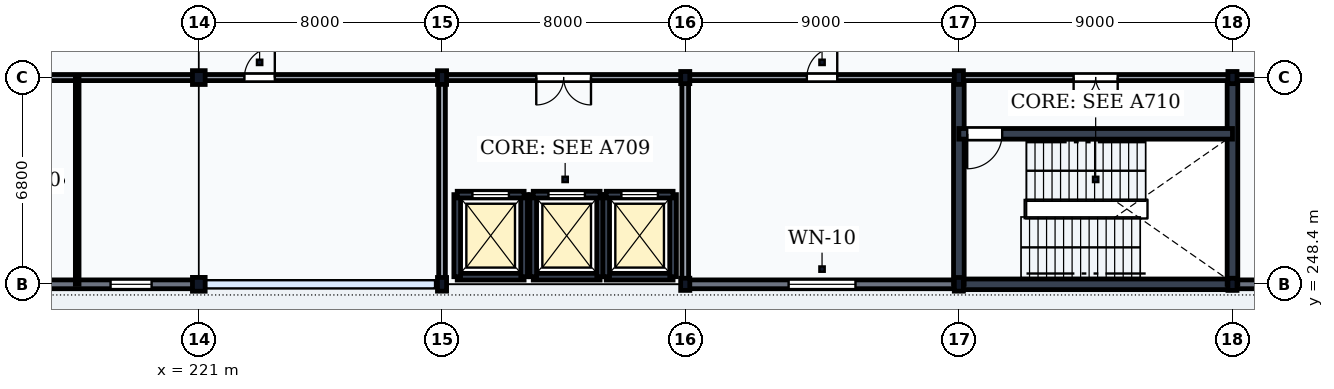
"""IFC4 building model, lengths in metres.
Left out: names, types, materials, properties, quantities, classifications, styles, units other than length and angle.
Written with IfcOpenShell. Run it as: python <this file> out.ifc"""

import sys

from ifc_helpers import new_model, si_unit, direction, frame, frame_2d, origin, origin_2d, place, context, subcontext, project, spatial, rectangle, i_section, extrude, element, fill, save


model = new_model("IFC4")
c1 = context("Model", 3, precision=1e-05, world=origin(), true_north=direction((0.0, 1.0)))
c2 = subcontext(c1, "Body", "Model", "MODEL_VIEW")
j1 = project(units=[si_unit("LENGTHUNIT", "METRE"), si_unit("PLANEANGLEUNIT", "RADIAN")], contexts=[c1])
p1 = place(None, origin())
s1 = spatial("IfcSite", under=j1, at=p1, CompositionType="ELEMENT")
p2 = place(p1, origin())
s2 = spatial("IfcBuilding", under=s1, at=p2, CompositionType="ELEMENT")
p3 = place(p2, frame((0.0, 0.0, 5.4)))
s3 = spatial("IfcBuildingStorey", under=s2, at=p3, CompositionType="ELEMENT", Elevation=5.4)
for number, where, z_axis, x_axis in (
    (1, (221.0, 248.4, 0.0), (0.0, 0.0, 1.0), (1.0, 0.0, 0.0)),
    (2, (221.0, 255.2, 0.0), (0.0, 0.0, 1.0), (1.0, 0.0, 0.0)),
):
    element("IfcColumn", number, at=place(p3, frame(where, z_axis=z_axis, x_axis=x_axis)), inside=s3, PredefinedType="COLUMN", context=c2, shape_type="SweptSolid", body=[
        extrude(i_section(OverallWidth=0.418, OverallDepth=0.455, WebThickness=0.042, FlangeThickness=0.068, FilletRadius=0.015, at=origin_2d()), origin(), (0.0, 0.0, 1.0), 5.1),
    ])
for number, where, z_axis, x_axis in (
    (3, (229.0, 248.4, 0.0), (0.0, 0.0, 1.0), (1.0, 0.0, 0.0)),
    (4, (229.0, 255.2, 0.0), (0.0, 0.0, 1.0), (1.0, 0.0, 0.0)),
):
    element("IfcColumn", number, at=place(p3, frame(where, z_axis=z_axis, x_axis=x_axis)), inside=s3, PredefinedType="COLUMN", context=c2, shape_type="SweptSolid", body=[
        extrude(i_section(OverallWidth=0.3, OverallDepth=0.45, WebThickness=0.014, FlangeThickness=0.026, FilletRadius=0.027, at=origin_2d()), origin(), (0.0, 0.0, 1.0), 5.1),
    ])
for number, where, z_axis, x_axis in (
    (5, (237.0, 248.4, 0.0), (0.0, 0.0, 1.0), (1.0, 0.0, 0.0)),
    (6, (237.0, 255.2, 0.0), (0.0, 0.0, 1.0), (1.0, 0.0, 0.0)),
):
    element("IfcColumn", number, at=place(p3, frame(where, z_axis=z_axis, x_axis=x_axis)), inside=s3, PredefinedType="COLUMN", context=c2, shape_type="SweptSolid", body=[
        extrude(i_section(OverallWidth=0.3, OverallDepth=0.4, WebThickness=0.013, FlangeThickness=0.024, FilletRadius=0.027, at=origin_2d()), origin(), (0.0, 0.0, 1.0), 5.1),
    ])
for number, where, z_axis, x_axis in (
    (7, (246.0, 248.4, 0.0), (0.0, 0.0, 1.0), (1.0, 0.0, 0.0)),
    (8, (246.0, 255.2, 0.0), (0.0, 0.0, 1.0), (1.0, 0.0, 0.0)),
):
    element("IfcColumn", number, at=place(p3, frame(where, z_axis=z_axis, x_axis=x_axis)), inside=s3, PredefinedType="COLUMN", context=c2, shape_type="SweptSolid", body=[
        extrude(i_section(OverallWidth=0.3, OverallDepth=0.45, WebThickness=0.014, FlangeThickness=0.026, FilletRadius=0.027, at=origin_2d()), origin(), (0.0, 0.0, 1.0), 5.1),
    ])
for number, where, z_axis, x_axis in (
    (9, (255.0, 248.4, 0.0), (0.0, 0.0, 1.0), (1.0, 0.0, 0.0)),
    (10, (255.0, 255.2, 0.0), (0.0, 0.0, 1.0), (1.0, 0.0, 0.0)),
):
    element("IfcColumn", number, at=place(p3, frame(where, z_axis=z_axis, x_axis=x_axis)), inside=s3, PredefinedType="COLUMN", context=c2, shape_type="SweptSolid", body=[
        extrude(i_section(OverallWidth=0.3, OverallDepth=0.4, WebThickness=0.013, FlangeThickness=0.024, FilletRadius=0.027, at=origin_2d()), origin(), (0.0, 0.0, 1.0), 5.1),
    ])
p4 = place(p3, frame((213.006, 248.4, 0.0), z_axis=(0.0, 0.0, 1.0), x_axis=(1.0, 0.0, 0.0)))
e11 = element("IfcWall", 11, at=p4, inside=s3, PredefinedType="SOLIDWALL", context=c2, shape_type="SweptSolid", body=[
    extrude(rectangle(XDim=7.988, YDim=0.29, at=frame_2d((3.994, 0.0))), origin(), (0.0, 0.0, 1.0), 4.548),
])
p5 = place(p4, frame((5.091, 0.0, 0.95)))
e12 = element("IfcOpeningElement", 12, at=p5, cuts=e11, PredefinedType="OPENING", context=c2, shape_type="SweptSolid", body=[
    extrude(rectangle(XDim=1.35, YDim=1.8, at=frame_2d((0.675, 0.9))), frame((0.0, 0.16, 0.0), z_axis=(0.0, -1.0, 0.0), x_axis=(1.0, 0.0, 0.0)), (0.0, 0.0, 1.0), 0.32),
])
p6 = place(p3, frame((237.006, 248.4, 0.0), z_axis=(0.0, 0.0, 1.0), x_axis=(1.0, 0.0, 0.0)))
e13 = element("IfcWall", 13, at=p6, inside=s3, PredefinedType="SOLIDWALL", context=c2, shape_type="SweptSolid", body=[
    extrude(rectangle(XDim=8.988, YDim=0.29, at=frame_2d((4.494, 0.0))), origin(), (0.0, 0.0, 1.0), 4.508),
])
p7 = place(p6, frame((3.394, 0.0, 0.95)))
e14 = element("IfcOpeningElement", 14, at=p7, cuts=e13, PredefinedType="OPENING", context=c2, shape_type="SweptSolid", body=[
    extrude(rectangle(XDim=2.2, YDim=2.1, at=frame_2d((1.1, 1.05))), frame((0.0, 0.16, 0.0), z_axis=(0.0, -1.0, 0.0), x_axis=(1.0, 0.0, 0.0)), (0.0, 0.0, 1.0), 0.32),
])
p8 = place(p3, frame((255.006, 248.4, 0.0), z_axis=(0.0, 0.0, 1.0), x_axis=(1.0, 0.0, 0.0)))
e15 = element("IfcWall", 15, at=p8, inside=s3, PredefinedType="SOLIDWALL", context=c2, shape_type="SweptSolid", body=[
    extrude(rectangle(XDim=8.988, YDim=0.29, at=frame_2d((4.494, 0.0))), origin(), (0.0, 0.0, 1.0), 4.508),
])
p9 = place(p8, frame((3.594, 0.0, 0.95)))
e16 = element("IfcOpeningElement", 16, at=p9, cuts=e15, PredefinedType="OPENING", context=c2, shape_type="SweptSolid", body=[
    extrude(rectangle(XDim=1.8, YDim=2.0, at=frame_2d((0.9, 1.0))), frame((0.0, 0.16, 0.0), z_axis=(0.0, -1.0, 0.0), x_axis=(1.0, 0.0, 0.0)), (0.0, 0.0, 1.0), 0.32),
])
p10 = place(p3, frame((246.0, 248.4, 0.0), z_axis=(0.0, 0.0, 1.0), x_axis=(1.0, 0.0, 0.0)))
e17 = element("IfcWall", 17, at=p10, inside=s3, PredefinedType="SHEAR", context=c2, shape_type="SweptSolid", body=[
    extrude(rectangle(XDim=9.0, YDim=0.35, at=frame_2d((4.5, 0.0))), origin(), (0.0, 0.0, 1.0), 4.86),
])
for number, where, z_axis, x_axis in (
    (18, (246.0, 248.4, 0.0), (0.0, 0.0, 1.0), (0.0, 1.0, 0.0)),
    (19, (255.0, 248.4, 0.0), (0.0, 0.0, 1.0), (0.0, 1.0, 0.0)),
):
    element("IfcWall", number, at=place(p3, frame(where, z_axis=z_axis, x_axis=x_axis)), inside=s3, PredefinedType="SHEAR", context=c2, shape_type="SweptSolid", body=[
        extrude(rectangle(XDim=6.8, YDim=0.35, at=frame_2d((3.4, 0.0))), origin(), (0.0, 0.0, 1.0), 4.86),
    ])
p11 = place(p3, frame((246.0, 253.35, 0.0), z_axis=(0.0, 0.0, 1.0), x_axis=(1.0, 0.0, 0.0)))
e20 = element("IfcWall", 20, at=p11, inside=s3, PredefinedType="SHEAR", context=c2, shape_type="SweptSolid", body=[
    extrude(rectangle(XDim=9.0, YDim=0.35, at=frame_2d((4.5, 0.0))), origin(), (0.0, 0.0, 1.0), 4.86),
])
p12 = place(p11, frame((0.275, 0.0, 0.0)))
e21 = element("IfcOpeningElement", 21, at=p12, cuts=e20, PredefinedType="OPENING", context=c2, shape_type="SweptSolid", body=[
    extrude(rectangle(XDim=1.15, YDim=2.15, at=frame_2d((0.575, 1.075))), frame((0.0, 0.19, 0.0), z_axis=(0.0, -1.0, 0.0), x_axis=(1.0, 0.0, 0.0)), (0.0, 0.0, 1.0), 0.38),
])
p13 = place(p3, frame((246.0, 255.2, 0.0), z_axis=(0.0, 0.0, 1.0), x_axis=(1.0, 0.0, 0.0)))
e22 = element("IfcWall", 22, at=p13, inside=s3, PredefinedType="PARTITIONING", context=c2, shape_type="SweptSolid", body=[
    extrude(rectangle(XDim=9.0, YDim=0.2, at=frame_2d((4.5, 0.0))), origin(), (0.0, 0.0, 1.0), 4.308),
])
p14 = place(p13, frame((3.775, 0.0, 0.0)))
e23 = element("IfcOpeningElement", 23, at=p14, cuts=e22, PredefinedType="OPENING", context=c2, shape_type="SweptSolid", body=[
    extrude(rectangle(XDim=1.45, YDim=2.2, at=frame_2d((0.725, 1.1))), frame((0.0, 0.115, 0.0), z_axis=(0.0, -1.0, 0.0), x_axis=(1.0, 0.0, 0.0)), (0.0, 0.0, 1.0), 0.23),
])
p15 = place(p3, frame((229.5, 248.65, 0.0), z_axis=(0.0, 0.0, 1.0), x_axis=(1.0, 0.0, 0.0)))
e24 = element("IfcWall", 24, at=p15, inside=s3, PredefinedType="SHEAR", context=c2, shape_type="SweptSolid", body=[
    extrude(rectangle(XDim=2.2, YDim=0.22, at=frame_2d((1.1, 0.0))), origin(), (0.0, 0.0, 1.0), 4.86),
])
for number, where, z_axis, x_axis in (
    (25, (229.5, 248.65, 0.0), (0.0, 0.0, 1.0), (0.0, 1.0, 0.0)),
    (26, (231.7, 248.65, 0.0), (0.0, 0.0, 1.0), (0.0, 1.0, 0.0)),
):
    element("IfcWall", number, at=place(p3, frame(where, z_axis=z_axis, x_axis=x_axis)), inside=s3, PredefinedType="SHEAR", context=c2, shape_type="SweptSolid", body=[
        extrude(rectangle(XDim=2.7, YDim=0.22, at=frame_2d((1.35, 0.0))), origin(), (0.0, 0.0, 1.0), 4.86),
    ])
p16 = place(p3, frame((229.5, 251.35, 0.0), z_axis=(0.0, 0.0, 1.0), x_axis=(1.0, 0.0, 0.0)))
e27 = element("IfcWall", 27, at=p16, inside=s3, PredefinedType="SHEAR", context=c2, shape_type="SweptSolid", body=[
    extrude(rectangle(XDim=2.2, YDim=0.22, at=frame_2d((1.1, 0.0))), origin(), (0.0, 0.0, 1.0), 4.86),
])
p17 = place(p16, frame((0.5, 0.0, 0.0)))
e28 = element("IfcOpeningElement", 28, at=p17, cuts=e27, PredefinedType="OPENING", context=c2, shape_type="SweptSolid", body=[
    extrude(rectangle(XDim=1.2, YDim=2.2, at=frame_2d((0.6, 1.1))), frame((0.0, 0.125, 0.0), z_axis=(0.0, -1.0, 0.0), x_axis=(1.0, 0.0, 0.0)), (0.0, 0.0, 1.0), 0.25),
])
p18 = place(p3, frame((232.0, 248.65, 0.0), z_axis=(0.0, 0.0, 1.0), x_axis=(1.0, 0.0, 0.0)))
e29 = element("IfcWall", 29, at=p18, inside=s3, PredefinedType="SHEAR", context=c2, shape_type="SweptSolid", body=[
    extrude(rectangle(XDim=2.2, YDim=0.22, at=frame_2d((1.1, 0.0))), origin(), (0.0, 0.0, 1.0), 4.86),
])
for number, where, z_axis, x_axis in (
    (30, (232.0, 248.65, 0.0), (0.0, 0.0, 1.0), (0.0, 1.0, 0.0)),
    (31, (234.2, 248.65, 0.0), (0.0, 0.0, 1.0), (0.0, 1.0, 0.0)),
):
    element("IfcWall", number, at=place(p3, frame(where, z_axis=z_axis, x_axis=x_axis)), inside=s3, PredefinedType="SHEAR", context=c2, shape_type="SweptSolid", body=[
        extrude(rectangle(XDim=2.7, YDim=0.22, at=frame_2d((1.35, 0.0))), origin(), (0.0, 0.0, 1.0), 4.86),
    ])
p19 = place(p3, frame((232.0, 251.35, 0.0), z_axis=(0.0, 0.0, 1.0), x_axis=(1.0, 0.0, 0.0)))
e32 = element("IfcWall", 32, at=p19, inside=s3, PredefinedType="SHEAR", context=c2, shape_type="SweptSolid", body=[
    extrude(rectangle(XDim=2.2, YDim=0.22, at=frame_2d((1.1, 0.0))), origin(), (0.0, 0.0, 1.0), 4.86),
])
p20 = place(p19, frame((0.5, 0.0, 0.0)))
e33 = element("IfcOpeningElement", 33, at=p20, cuts=e32, PredefinedType="OPENING", context=c2, shape_type="SweptSolid", body=[
    extrude(rectangle(XDim=1.2, YDim=2.2, at=frame_2d((0.6, 1.1))), frame((0.0, 0.125, 0.0), z_axis=(0.0, -1.0, 0.0), x_axis=(1.0, 0.0, 0.0)), (0.0, 0.0, 1.0), 0.25),
])
p21 = place(p3, frame((234.4, 248.65, 0.0), z_axis=(0.0, 0.0, 1.0), x_axis=(1.0, 0.0, 0.0)))
e34 = element("IfcWall", 34, at=p21, inside=s3, PredefinedType="SHEAR", context=c2, shape_type="SweptSolid", body=[
    extrude(rectangle(XDim=2.2, YDim=0.22, at=frame_2d((1.1, 0.0))), origin(), (0.0, 0.0, 1.0), 4.86),
])
for number, where, z_axis, x_axis in (
    (35, (234.4, 248.65, 0.0), (0.0, 0.0, 1.0), (0.0, 1.0, 0.0)),
    (36, (236.6, 248.65, 0.0), (0.0, 0.0, 1.0), (0.0, 1.0, 0.0)),
):
    element("IfcWall", number, at=place(p3, frame(where, z_axis=z_axis, x_axis=x_axis)), inside=s3, PredefinedType="SHEAR", context=c2, shape_type="SweptSolid", body=[
        extrude(rectangle(XDim=2.7, YDim=0.22, at=frame_2d((1.35, 0.0))), origin(), (0.0, 0.0, 1.0), 4.86),
    ])
p22 = place(p3, frame((234.4, 251.35, 0.0), z_axis=(0.0, 0.0, 1.0), x_axis=(1.0, 0.0, 0.0)))
e37 = element("IfcWall", 37, at=p22, inside=s3, PredefinedType="SHEAR", context=c2, shape_type="SweptSolid", body=[
    extrude(rectangle(XDim=2.2, YDim=0.22, at=frame_2d((1.1, 0.0))), origin(), (0.0, 0.0, 1.0), 4.86),
])
p23 = place(p22, frame((0.5, 0.0, 0.0)))
e38 = element("IfcOpeningElement", 38, at=p23, cuts=e37, PredefinedType="OPENING", context=c2, shape_type="SweptSolid", body=[
    extrude(rectangle(XDim=1.2, YDim=2.2, at=frame_2d((0.6, 1.1))), frame((0.0, 0.125, 0.0), z_axis=(0.0, -1.0, 0.0), x_axis=(1.0, 0.0, 0.0)), (0.0, 0.0, 1.0), 0.25),
])
for number, where, z_axis, x_axis in (
    (39, (229.0, 248.4, 0.0), (0.0, 0.0, 1.0), (0.0, 1.0, 0.0)),
    (40, (237.0, 248.4, 0.0), (0.0, 0.0, 1.0), (0.0, 1.0, 0.0)),
):
    element("IfcWall", number, at=place(p3, frame(where, z_axis=z_axis, x_axis=x_axis)), inside=s3, PredefinedType="PARTITIONING", context=c2, shape_type="SweptSolid", body=[
        extrude(rectangle(XDim=6.8, YDim=0.22, at=frame_2d((3.4, 0.0))), origin(), (0.0, 0.0, 1.0), 4.498),
    ])
p24 = place(p3, frame((229.0, 255.2, 0.0), z_axis=(0.0, 0.0, 1.0), x_axis=(1.0, 0.0, 0.0)))
e41 = element("IfcWall", 41, at=p24, inside=s3, PredefinedType="PARTITIONING", context=c2, shape_type="SweptSolid", body=[
    extrude(rectangle(XDim=8.0, YDim=0.2, at=frame_2d((4.0, 0.0))), origin(), (0.0, 0.0, 1.0), 4.408),
])
p25 = place(p24, frame((3.1, 0.0, 0.0)))
e42 = element("IfcOpeningElement", 42, at=p25, cuts=e41, PredefinedType="OPENING", context=c2, shape_type="SweptSolid", body=[
    extrude(rectangle(XDim=1.8, YDim=2.4, at=frame_2d((0.9, 1.2))), frame((0.0, 0.115, 0.0), z_axis=(0.0, -1.0, 0.0), x_axis=(1.0, 0.0, 0.0)), (0.0, 0.0, 1.0), 0.23),
])
p26 = place(p3, frame((205.0, 255.2, 0.0), z_axis=(0.0, 0.0, 1.0), x_axis=(1.0, 0.0, 0.0)))
e43 = element("IfcWall", 43, at=p26, inside=s3, PredefinedType="PARTITIONING", context=c2, shape_type="SweptSolid", body=[
    extrude(rectangle(XDim=24.0, YDim=0.2, at=frame_2d((12.0, 0.0))), origin(), (0.0, 0.0, 1.0), 4.358),
])
p27 = place(p26, frame((5.5, 0.0, 0.0)))
e44 = element("IfcOpeningElement", 44, at=p27, cuts=e43, PredefinedType="OPENING", context=c2, shape_type="SweptSolid", body=[
    extrude(rectangle(XDim=1.0, YDim=2.1, at=frame_2d((0.5, 1.05))), frame((0.0, 0.115, 0.0), z_axis=(0.0, -1.0, 0.0), x_axis=(1.0, 0.0, 0.0)), (0.0, 0.0, 1.0), 0.23),
])
p28 = place(p26, frame((17.5, 0.0, 0.0)))
e45 = element("IfcOpeningElement", 45, at=p28, cuts=e43, PredefinedType="OPENING", context=c2, shape_type="SweptSolid", body=[
    extrude(rectangle(XDim=1.0, YDim=2.1, at=frame_2d((0.5, 1.05))), frame((0.0, 0.115, 0.0), z_axis=(0.0, -1.0, 0.0), x_axis=(1.0, 0.0, 0.0)), (0.0, 0.0, 1.0), 0.23),
])
p29 = place(p3, frame((217.0, 248.4, 0.0), z_axis=(0.0, 0.0, 1.0), x_axis=(0.0, 1.0, 0.0)))
e46 = element("IfcWall", 46, at=p29, inside=s3, PredefinedType="PARTITIONING", context=c2, shape_type="SweptSolid", body=[
    extrude(rectangle(XDim=6.8, YDim=0.12, at=frame_2d((3.4, 0.0))), origin(), (0.0, 0.0, 1.0), 4.618),
])
p30 = place(p3, frame((237.0, 255.2, 0.0), z_axis=(0.0, 0.0, 1.0), x_axis=(1.0, 0.0, 0.0)))
e47 = element("IfcWall", 47, at=p30, inside=s3, PredefinedType="PARTITIONING", context=c2, shape_type="SweptSolid", body=[
    extrude(rectangle(XDim=9.0, YDim=0.2, at=frame_2d((4.5, 0.0))), origin(), (0.0, 0.0, 1.0), 4.308),
])
p31 = place(p30, frame((4.0, 0.0, 0.0)))
e48 = element("IfcOpeningElement", 48, at=p31, cuts=e47, PredefinedType="OPENING", context=c2, shape_type="SweptSolid", body=[
    extrude(rectangle(XDim=1.0, YDim=2.1, at=frame_2d((0.5, 1.05))), frame((0.0, 0.115, 0.0), z_axis=(0.0, -1.0, 0.0), x_axis=(1.0, 0.0, 0.0)), (0.0, 0.0, 1.0), 0.23),
])
p32 = place(p3, frame((255.0, 255.2, 0.0), z_axis=(0.0, 0.0, 1.0), x_axis=(1.0, 0.0, 0.0)))
e49 = element("IfcWall", 49, at=p32, inside=s3, PredefinedType="PARTITIONING", context=c2, shape_type="SweptSolid", body=[
    extrude(rectangle(XDim=18.0, YDim=0.2, at=frame_2d((9.0, 0.0))), origin(), (0.0, 0.0, 1.0), 4.308),
])
p33 = place(p32, frame((4.0, 0.0, 0.0)))
e50 = element("IfcOpeningElement", 50, at=p33, cuts=e49, PredefinedType="OPENING", context=c2, shape_type="SweptSolid", body=[
    extrude(rectangle(XDim=1.0, YDim=2.1, at=frame_2d((0.5, 1.05))), frame((0.0, 0.115, 0.0), z_axis=(0.0, -1.0, 0.0), x_axis=(1.0, 0.0, 0.0)), (0.0, 0.0, 1.0), 0.23),
])
p34 = place(p5, origin())
e51 = element("IfcWindow", 51, at=p34, inside=s3, PartitioningType="SINGLE_PANEL", PredefinedType="WINDOW", context=c2, shape_type="SweptSolid", body=[
    extrude(rectangle(XDim=1.35, YDim=1.8, at=frame_2d((0.675, 0.9))), frame((0.0, 0.03, 0.0), z_axis=(0.0, -1.0, 0.0), x_axis=(1.0, 0.0, 0.0)), (0.0, 0.0, 1.0), 0.06),
])
fill(e12, e51)
p35 = place(p7, origin())
e52 = element("IfcWindow", 52, at=p35, inside=s3, PartitioningType="DOUBLE_PANEL_VERTICAL", PredefinedType="WINDOW", context=c2, shape_type="SweptSolid", body=[
    extrude(rectangle(XDim=2.2, YDim=2.1, at=frame_2d((1.1, 1.05))), frame((0.0, 0.03, 0.0), z_axis=(0.0, -1.0, 0.0), x_axis=(1.0, 0.0, 0.0)), (0.0, 0.0, 1.0), 0.06),
])
fill(e14, e52)
p36 = place(p12, frame((1.15, 0.0, 0.0), z_axis=(0.0, 0.0, 1.0), x_axis=(-1.0, 0.0, 0.0)))
e53 = element("IfcDoor", 53, at=p36, inside=s3, OperationType="SINGLE_SWING_RIGHT", PredefinedType="DOOR", context=c2, shape_type="SweptSolid", body=[
    extrude(rectangle(XDim=1.15, YDim=2.15, at=frame_2d((0.575, 1.075))), frame((0.0, 0.025, 0.0), z_axis=(0.0, -1.0, 0.0), x_axis=(1.0, 0.0, 0.0)), (0.0, 0.0, 1.0), 0.05),
])
fill(e21, e53)
p37 = place(p14, frame((1.45, 0.0, 0.0), z_axis=(0.0, 0.0, 1.0), x_axis=(-1.0, 0.0, 0.0)))
e54 = element("IfcDoor", 54, at=p37, inside=s3, OperationType="DOUBLE_DOOR_SINGLE_SWING", PredefinedType="DOOR", context=c2, shape_type="SweptSolid", body=[
    extrude(rectangle(XDim=1.45, YDim=2.2, at=frame_2d((0.725, 1.1))), frame((0.0, 0.025, 0.0), z_axis=(0.0, -1.0, 0.0), x_axis=(1.0, 0.0, 0.0)), (0.0, 0.0, 1.0), 0.05),
])
fill(e23, e54)
p38 = place(p17, origin())
e55 = element("IfcDoor", 55, at=p38, inside=s3, OperationType="DOUBLE_DOOR_SLIDING", PredefinedType="USERDEFINED", context=c2, shape_type="SweptSolid", body=[
    extrude(rectangle(XDim=1.2, YDim=2.2, at=frame_2d((0.6, 1.1))), frame((0.0, 0.025, 0.0), z_axis=(0.0, -1.0, 0.0), x_axis=(1.0, 0.0, 0.0)), (0.0, 0.0, 1.0), 0.05),
])
fill(e28, e55)
p39 = place(p20, origin())
e56 = element("IfcDoor", 56, at=p39, inside=s3, OperationType="DOUBLE_DOOR_SLIDING", PredefinedType="USERDEFINED", context=c2, shape_type="SweptSolid", body=[
    extrude(rectangle(XDim=1.2, YDim=2.2, at=frame_2d((0.6, 1.1))), frame((0.0, 0.025, 0.0), z_axis=(0.0, -1.0, 0.0), x_axis=(1.0, 0.0, 0.0)), (0.0, 0.0, 1.0), 0.05),
])
fill(e33, e56)
p40 = place(p23, origin())
e57 = element("IfcDoor", 57, at=p40, inside=s3, OperationType="DOUBLE_DOOR_SLIDING", PredefinedType="USERDEFINED", context=c2, shape_type="SweptSolid", body=[
    extrude(rectangle(XDim=1.2, YDim=2.2, at=frame_2d((0.6, 1.1))), frame((0.0, 0.025, 0.0), z_axis=(0.0, -1.0, 0.0), x_axis=(1.0, 0.0, 0.0)), (0.0, 0.0, 1.0), 0.05),
])
fill(e38, e57)
p41 = place(p25, frame((1.8, 0.0, 0.0), z_axis=(0.0, 0.0, 1.0), x_axis=(-1.0, 0.0, 0.0)))
e58 = element("IfcDoor", 58, at=p41, inside=s3, OperationType="DOUBLE_DOOR_SINGLE_SWING", PredefinedType="DOOR", context=c2, shape_type="SweptSolid", body=[
    extrude(rectangle(XDim=1.8, YDim=2.4, at=frame_2d((0.9, 1.2))), frame((0.0, 0.025, 0.0), z_axis=(0.0, -1.0, 0.0), x_axis=(1.0, 0.0, 0.0)), (0.0, 0.0, 1.0), 0.05),
])
fill(e42, e58)
p42 = place(p28, frame((1.0, 0.0, 0.0), z_axis=(0.0, 0.0, 1.0), x_axis=(-1.0, 0.0, 0.0)))
e59 = element("IfcDoor", 59, at=p42, inside=s3, OperationType="SINGLE_SWING_LEFT", PredefinedType="DOOR", context=c2, shape_type="SweptSolid", body=[
    extrude(rectangle(XDim=1.0, YDim=2.1, at=frame_2d((0.5, 1.05))), frame((0.0, 0.025, 0.0), z_axis=(0.0, -1.0, 0.0), x_axis=(1.0, 0.0, 0.0)), (0.0, 0.0, 1.0), 0.05),
])
fill(e45, e59)
p43 = place(p31, frame((1.0, 0.0, 0.0), z_axis=(0.0, 0.0, 1.0), x_axis=(-1.0, 0.0, 0.0)))
e60 = element("IfcDoor", 60, at=p43, inside=s3, OperationType="SINGLE_SWING_LEFT", PredefinedType="DOOR", context=c2, shape_type="SweptSolid", body=[
    extrude(rectangle(XDim=1.0, YDim=2.1, at=frame_2d((0.5, 1.05))), frame((0.0, 0.025, 0.0), z_axis=(0.0, -1.0, 0.0), x_axis=(1.0, 0.0, 0.0)), (0.0, 0.0, 1.0), 0.05),
])
fill(e48, e60)
save(model, sys.argv[1])
